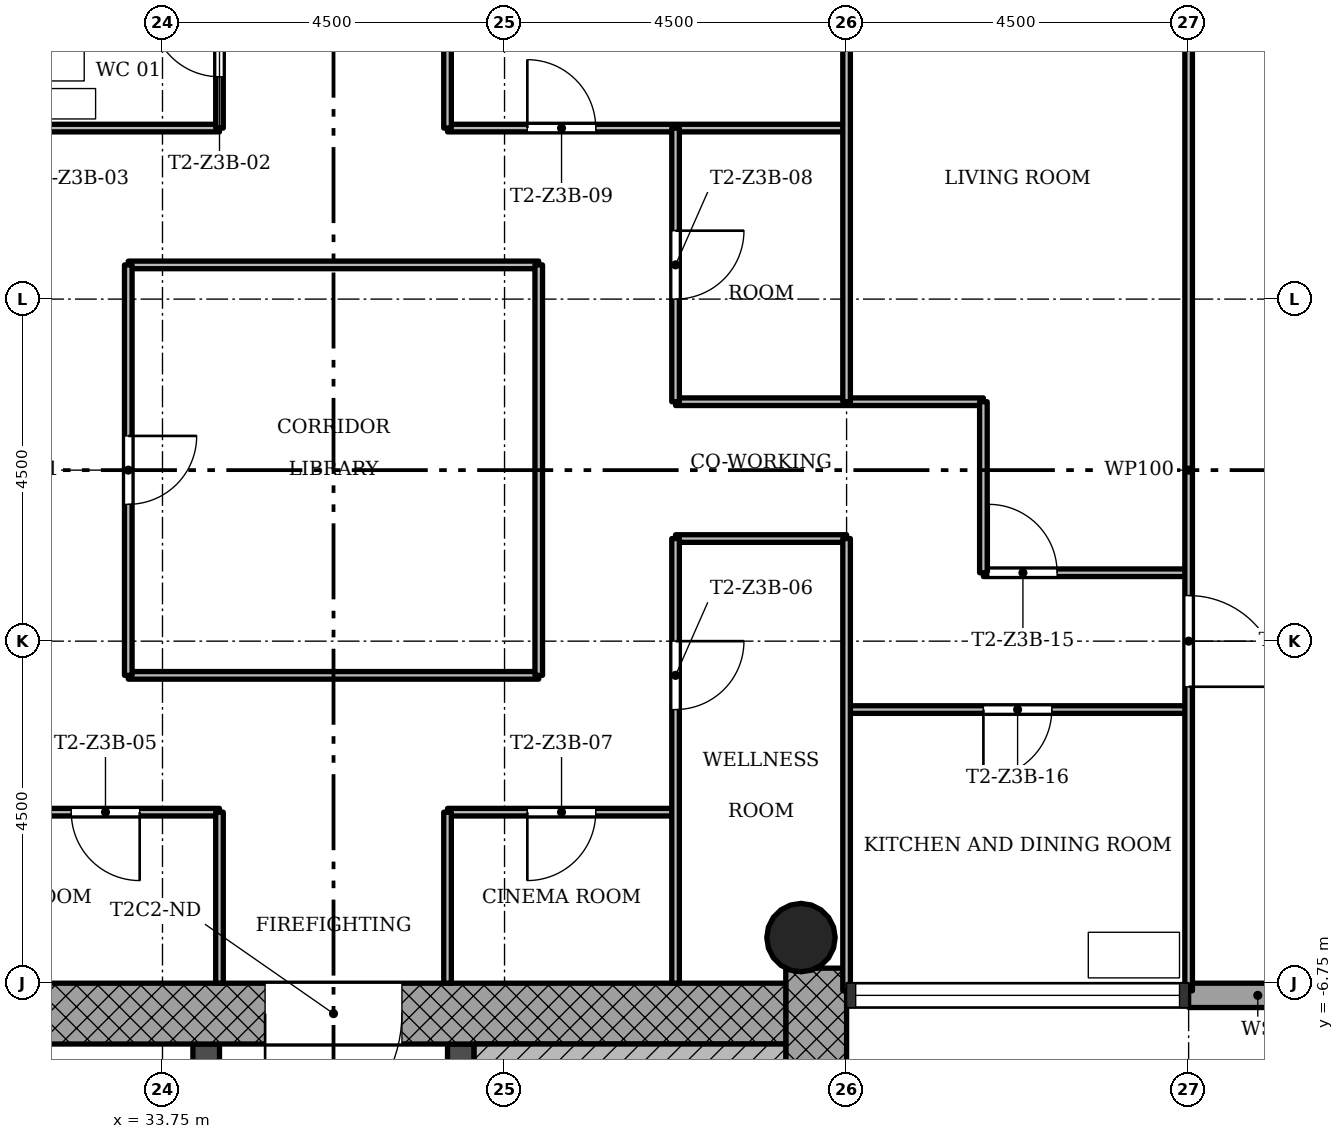
"""IFC4 building model, lengths in metres.
Left out: names, types, materials, properties, quantities, classifications, styles, units other than length and angle.
Written with IfcOpenShell. Run it as: python <this file> out.ifc"""

import sys

from ifc_helpers import new_model, si_unit, direction, frame, frame_2d, origin, origin_2d, place, context, subcontext, project, spatial, rectangle, hollow_circle, extrude, element, fill, save


model = new_model("IFC4")
c1 = context("Model", 3, precision=1e-05, world=origin(), true_north=direction((0.0, 1.0)))
c2 = subcontext(c1, "Body", "Model", "MODEL_VIEW")
j1 = project(units=[si_unit("LENGTHUNIT", "METRE"), si_unit("PLANEANGLEUNIT", "RADIAN")], contexts=[c1])
p1 = place(None, origin())
s1 = spatial("IfcSite", under=j1, at=p1, CompositionType="ELEMENT")
p2 = place(p1, origin())
s2 = spatial("IfcBuilding", under=s1, at=p2, CompositionType="ELEMENT")
p3 = place(p2, frame((0.0, 0.0, 143.9)))
s3 = spatial("IfcBuildingStorey", under=s2, at=p3, CompositionType="ELEMENT", Elevation=143.9)
p4 = place(p3, frame((42.35, -14.95, 0.0), z_axis=(0.0, 0.0, 1.0), x_axis=(0.0, 1.0, 0.0)))
e1 = element("IfcWall", 1, at=p4, inside=s3, PredefinedType="SHEAR", context=c2, shape_type="SweptSolid", body=[
    extrude(rectangle(XDim=8.398, YDim=0.8, at=frame_2d((4.199, 0.0))), origin(), (0.0, 0.0, 1.0), 3.4),
])
p5 = place(p3, frame((41.95, -7.15, 0.0), z_axis=(0.0, 0.0, 1.0), x_axis=(-1.0, 0.0, 0.0)))
e2 = element("IfcWall", 2, at=p5, inside=s3, PredefinedType="SHEAR", context=c2, shape_type="SweptSolid", body=[
    extrude(rectangle(XDim=12.7, YDim=0.8, at=frame_2d((6.35, 0.0))), origin(), (0.0, 0.0, 1.0), 3.4),
])
p6 = place(p5, frame((5.05, 0.0, 0.0)))
e3 = element("IfcOpeningElement", 3, at=p6, cuts=e2, PredefinedType="OPENING", context=c2, shape_type="SweptSolid", body=[
    extrude(rectangle(XDim=1.8, YDim=2.1, at=frame_2d((0.9, 1.05))), frame((0.0, 0.41, 0.0), z_axis=(0.0, -1.0, 0.0), x_axis=(1.0, 0.0, 0.0)), (0.0, 0.0, 1.0), 0.82),
])
p7 = place(p3, frame((34.325, -14.95, 0.0), z_axis=(0.0, 0.0, 1.0), x_axis=(0.0, 1.0, 0.0)))
e4 = element("IfcWall", 4, at=p7, inside=s3, PredefinedType="SHEAR", context=c2, shape_type="SweptSolid", body=[
    extrude(rectangle(XDim=7.4, YDim=0.35, at=frame_2d((3.7, 0.0))), origin(), (0.0, 0.0, 1.0), 3.4),
])
p8 = place(p7, frame((5.35, 0.0, 0.0)))
e5 = element("IfcOpeningElement", 5, at=p8, cuts=e4, PredefinedType="OPENING", context=c2, shape_type="SweptSolid", body=[
    extrude(rectangle(XDim=1.1, YDim=2.1, at=frame_2d((0.55, 1.05))), frame((0.0, 0.185, 0.0), z_axis=(0.0, -1.0, 0.0), x_axis=(1.0, 0.0, 0.0)), (0.0, 0.0, 1.0), 0.37),
])
p9 = place(p7, frame((1.0, 0.0, 0.0)))
e6 = element("IfcOpeningElement", 6, at=p9, cuts=e4, PredefinedType="OPENING", context=c2, shape_type="SweptSolid", body=[
    extrude(rectangle(XDim=1.1, YDim=2.1, at=frame_2d((0.55, 1.05))), frame((0.0, 0.185, 0.0), z_axis=(0.0, -1.0, 0.0), x_axis=(1.0, 0.0, 0.0)), (0.0, 0.0, 1.0), 0.37),
])
p10 = place(p7, frame((3.3, 0.0, 0.0)))
e7 = element("IfcOpeningElement", 7, at=p10, cuts=e4, PredefinedType="OPENING", context=c2, shape_type="SweptSolid", body=[
    extrude(rectangle(XDim=0.9, YDim=2.1, at=frame_2d((0.45, 1.05))), frame((0.0, 0.185, 0.0), z_axis=(0.0, -1.0, 0.0), x_axis=(1.0, 0.0, 0.0)), (0.0, 0.0, 1.0), 0.37),
])
p11 = place(p3, frame((37.675, -14.95, 0.0), z_axis=(0.0, 0.0, 1.0), x_axis=(0.0, 1.0, 0.0)))
e8 = element("IfcWall", 8, at=p11, inside=s3, PredefinedType="SHEAR", context=c2, shape_type="SweptSolid", body=[
    extrude(rectangle(XDim=7.4, YDim=0.35, at=frame_2d((3.7, 0.0))), origin(), (0.0, 0.0, 1.0), 3.4),
])
p12 = place(p11, frame((5.65, 0.0, 0.0)))
e9 = element("IfcOpeningElement", 9, at=p12, cuts=e8, PredefinedType="OPENING", context=c2, shape_type="SweptSolid", body=[
    extrude(rectangle(XDim=0.9, YDim=2.1, at=frame_2d((0.45, 1.05))), frame((0.0, 0.185, 0.0), z_axis=(0.0, -1.0, 0.0), x_axis=(1.0, 0.0, 0.0)), (0.0, 0.0, 1.0), 0.37),
])
p13 = place(p3, frame((42.15, -6.15, 0.0), z_axis=(0.0, 0.0, 1.0), x_axis=(1.0, 0.0, 0.0)))
e10 = element("IfcColumn", 10, at=p13, inside=s3, PredefinedType="COLUMN", context=c2, shape_type="SweptSolid", body=[
    extrude(hollow_circle(Radius=0.45, WallThickness=0.032, at=origin_2d()), origin(), (0.0, 0.0, 1.0), 3.4),
])
p14 = place(p3, frame((47.25, -6.91, -0.3), z_axis=(0.0, 0.0, 1.0), x_axis=(1.0, 0.0, 0.0)))
e11 = element("IfcWall", 11, at=p14, inside=s3, PredefinedType="STANDARD", context=c2, shape_type="SweptSolid", body=[
    extrude(rectangle(XDim=1.82, YDim=0.32, at=frame_2d((0.91, 0.0))), origin(), (0.0, 0.0, 1.0), 3.4),
])
p15 = place(p3, frame((40.5, -4.5, 0.0), z_axis=(0.0, 0.0, 1.0), x_axis=(-1.0, 0.0, 0.0)))
e12 = element("IfcWall", 12, at=p15, inside=s3, PredefinedType="PARTITIONING", context=c2, shape_type="SweptSolid", body=[
    extrude(rectangle(XDim=3.0, YDim=0.1, at=frame_2d((1.5, 0.0))), origin(), (0.0, 0.0, 1.0), 3.0),
])
p16 = place(p15, frame((1.05, 0.0, 0.0)))
e13 = element("IfcOpeningElement", 13, at=p16, cuts=e12, PredefinedType="OPENING", context=c2, shape_type="SweptSolid", body=[
    extrude(rectangle(XDim=0.9, YDim=2.1, at=frame_2d((0.45, 1.05))), frame((0.0, 0.06, 0.0), z_axis=(0.0, -1.0, 0.0), x_axis=(1.0, 0.0, 0.0)), (0.0, 0.0, 1.0), 0.12),
])
p17 = place(p3, frame((34.5, -4.5, 0.0), z_axis=(0.0, 0.0, 1.0), x_axis=(-1.0, 0.0, 0.0)))
e14 = element("IfcWall", 14, at=p17, inside=s3, PredefinedType="PARTITIONING", context=c2, shape_type="SweptSolid", body=[
    extrude(rectangle(XDim=5.25, YDim=0.1, at=frame_2d((2.625, 0.0))), origin(), (0.0, 0.0, 1.0), 3.0),
])
p18 = place(p17, frame((1.05, 0.0, 0.0)))
e15 = element("IfcOpeningElement", 15, at=p18, cuts=e14, PredefinedType="OPENING", context=c2, shape_type="SweptSolid", body=[
    extrude(rectangle(XDim=0.9, YDim=2.1, at=frame_2d((0.45, 1.05))), frame((0.0, 0.06, 0.0), z_axis=(0.0, -1.0, 0.0), x_axis=(1.0, 0.0, 0.0)), (0.0, 0.0, 1.0), 0.12),
])
p19 = place(p3, frame((47.25, -3.15, 0.0), z_axis=(0.0, 0.0, 1.0), x_axis=(-1.0, 0.0, 0.0)))
e16 = element("IfcWall", 16, at=p19, inside=s3, PredefinedType="PARTITIONING", context=c2, shape_type="SweptSolid", body=[
    extrude(rectangle(XDim=4.5, YDim=0.1, at=frame_2d((2.25, 0.0))), origin(), (0.0, 0.0, 1.0), 3.0),
])
p20 = place(p19, frame((1.8, 0.0, 0.0)))
e17 = element("IfcOpeningElement", 17, at=p20, cuts=e16, PredefinedType="OPENING", context=c2, shape_type="SweptSolid", body=[
    extrude(rectangle(XDim=0.9, YDim=2.1, at=frame_2d((0.45, 1.05))), frame((0.0, 0.06, 0.0), z_axis=(0.0, -1.0, 0.0), x_axis=(1.0, 0.0, 0.0)), (0.0, 0.0, 1.0), 0.12),
])
p21 = place(p3, frame((38.7, -2.7, 0.0), z_axis=(0.0, 0.0, 1.0), x_axis=(-1.0, 0.0, 0.0)))
e18 = element("IfcWall", 18, at=p21, inside=s3, PredefinedType="PARTITIONING", context=c2, shape_type="SweptSolid", body=[
    extrude(rectangle(XDim=5.4, YDim=0.1, at=frame_2d((2.7, 0.0))), origin(), (0.0, 0.0, 1.0), 3.0),
])
p22 = place(p3, frame((47.25, -1.35, 0.0), z_axis=(0.0, 0.0, 1.0), x_axis=(-1.0, 0.0, 0.0)))
e19 = element("IfcWall", 19, at=p22, inside=s3, PredefinedType="PARTITIONING", context=c2, shape_type="SweptSolid", body=[
    extrude(rectangle(XDim=2.7, YDim=0.1, at=frame_2d((1.35, 0.0))), origin(), (0.0, 0.0, 1.0), 3.0),
])
p23 = place(p22, frame((1.73, 0.0, 0.0)))
e20 = element("IfcOpeningElement", 20, at=p23, cuts=e19, PredefinedType="OPENING", context=c2, shape_type="SweptSolid", body=[
    extrude(rectangle(XDim=0.9, YDim=2.1, at=frame_2d((0.45, 1.05))), frame((0.0, 0.06, 0.0), z_axis=(0.0, -1.0, 0.0), x_axis=(1.0, 0.0, 0.0)), (0.0, 0.0, 1.0), 0.12),
])
p24 = place(p3, frame((42.75, -0.9, 0.0), z_axis=(0.0, 0.0, 1.0), x_axis=(-1.0, 0.0, 0.0)))
e21 = element("IfcWall", 21, at=p24, inside=s3, PredefinedType="PARTITIONING", context=c2, shape_type="SweptSolid", body=[
    extrude(rectangle(XDim=2.25, YDim=0.1, at=frame_2d((1.125, 0.0))), origin(), (0.0, 0.0, 1.0), 3.0),
])
p25 = place(p3, frame((44.55, 0.9, 0.0), z_axis=(0.0, 0.0, 1.0), x_axis=(-1.0, 0.0, 0.0)))
e22 = element("IfcWall", 22, at=p25, inside=s3, PredefinedType="PARTITIONING", context=c2, shape_type="SweptSolid", body=[
    extrude(rectangle(XDim=4.05, YDim=0.1, at=frame_2d((2.025, 0.0))), origin(), (0.0, 0.0, 1.0), 3.0),
])
p26 = place(p3, frame((38.7, 2.7, 0.0), z_axis=(0.0, 0.0, 1.0), x_axis=(-1.0, 0.0, 0.0)))
e23 = element("IfcWall", 23, at=p26, inside=s3, PredefinedType="PARTITIONING", context=c2, shape_type="SweptSolid", body=[
    extrude(rectangle(XDim=5.4, YDim=0.1, at=frame_2d((2.7, 0.0))), origin(), (0.0, 0.0, 1.0), 3.0),
])
p27 = place(p3, frame((42.75, 4.5, 0.0), z_axis=(0.0, 0.0, 1.0), x_axis=(-1.0, 0.0, 0.0)))
e24 = element("IfcWall", 24, at=p27, inside=s3, PredefinedType="PARTITIONING", context=c2, shape_type="SweptSolid", body=[
    extrude(rectangle(XDim=5.25, YDim=0.1, at=frame_2d((2.625, 0.0))), origin(), (0.0, 0.0, 1.0), 3.0),
])
p28 = place(p27, frame((3.3, 0.0, 0.0)))
e25 = element("IfcOpeningElement", 25, at=p28, cuts=e24, PredefinedType="OPENING", context=c2, shape_type="SweptSolid", body=[
    extrude(rectangle(XDim=0.9, YDim=2.1, at=frame_2d((0.45, 1.05))), frame((0.0, 0.06, 0.0), z_axis=(0.0, -1.0, 0.0), x_axis=(1.0, 0.0, 0.0)), (0.0, 0.0, 1.0), 0.12),
])
p29 = place(p3, frame((34.5, 4.5, 0.0), z_axis=(0.0, 0.0, 1.0), x_axis=(-1.0, 0.0, 0.0)))
e26 = element("IfcWall", 26, at=p29, inside=s3, PredefinedType="PARTITIONING", context=c2, shape_type="SweptSolid", body=[
    extrude(rectangle(XDim=3.0, YDim=0.1, at=frame_2d((1.5, 0.0))), origin(), (0.0, 0.0, 1.0), 3.0),
])
p30 = place(p3, frame((47.25, -6.85, 0.0), z_axis=(0.0, 0.0, 1.0), x_axis=(0.0, 1.0, 0.0)))
e27 = element("IfcWall", 27, at=p30, inside=s3, PredefinedType="PARTITIONING", context=c2, shape_type="SweptSolid", body=[
    extrude(rectangle(XDim=13.7, YDim=0.1, at=frame_2d((6.85, 0.0))), origin(), (0.0, 0.0, 1.0), 3.0),
])
p31 = place(p30, frame((4.0, 0.0, 0.0)))
e28 = element("IfcOpeningElement", 28, at=p31, cuts=e27, PredefinedType="OPENING", context=c2, shape_type="SweptSolid", body=[
    extrude(rectangle(XDim=1.2, YDim=2.1, at=frame_2d((0.6, 1.05))), frame((0.0, 0.06, 0.0), z_axis=(0.0, -1.0, 0.0), x_axis=(1.0, 0.0, 0.0)), (0.0, 0.0, 1.0), 0.12),
])
p32 = place(p3, frame((44.55, -1.35, 0.0), z_axis=(0.0, 0.0, 1.0), x_axis=(0.0, 1.0, 0.0)))
e29 = element("IfcWall", 29, at=p32, inside=s3, PredefinedType="PARTITIONING", context=c2, shape_type="SweptSolid", body=[
    extrude(rectangle(XDim=2.25, YDim=0.1, at=frame_2d((1.125, 0.0))), origin(), (0.0, 0.0, 1.0), 3.0),
])
for number, where, z_axis, x_axis in (
    (30, (42.75, -6.85, 0.0), (0.0, 0.0, 1.0), (0.0, 1.0, 0.0)),
    (31, (42.75, 0.9, 0.0), (0.0, 0.0, 1.0), (0.0, 1.0, 0.0)),
):
    element("IfcWall", number, at=place(p3, frame(where, z_axis=z_axis, x_axis=x_axis)), inside=s3, PredefinedType="PARTITIONING", context=c2, shape_type="SweptSolid", body=[
        extrude(rectangle(XDim=5.95, YDim=0.1, at=frame_2d((2.975, 0.0))), origin(), (0.0, 0.0, 1.0), 3.0),
    ])
p33 = place(p3, frame((40.5, -6.75, 0.0), z_axis=(0.0, 0.0, 1.0), x_axis=(0.0, 1.0, 0.0)))
e32 = element("IfcWall", 32, at=p33, inside=s3, PredefinedType="PARTITIONING", context=c2, shape_type="SweptSolid", body=[
    extrude(rectangle(XDim=5.85, YDim=0.1, at=frame_2d((2.925, 0.0))), origin(), (0.0, 0.0, 1.0), 3.0),
])
p34 = place(p33, frame((3.6, 0.0, 0.0)))
e33 = element("IfcOpeningElement", 33, at=p34, cuts=e32, PredefinedType="OPENING", context=c2, shape_type="SweptSolid", body=[
    extrude(rectangle(XDim=0.9, YDim=2.1, at=frame_2d((0.45, 1.05))), frame((0.0, 0.06, 0.0), z_axis=(0.0, -1.0, 0.0), x_axis=(1.0, 0.0, 0.0)), (0.0, 0.0, 1.0), 0.12),
])
p35 = place(p3, frame((40.5, 0.9, 0.0), z_axis=(0.0, 0.0, 1.0), x_axis=(0.0, 1.0, 0.0)))
e34 = element("IfcWall", 34, at=p35, inside=s3, PredefinedType="PARTITIONING", context=c2, shape_type="SweptSolid", body=[
    extrude(rectangle(XDim=3.6, YDim=0.1, at=frame_2d((1.8, 0.0))), origin(), (0.0, 0.0, 1.0), 3.0),
])
p36 = place(p35, frame((1.35, 0.0, 0.0)))
e35 = element("IfcOpeningElement", 35, at=p36, cuts=e34, PredefinedType="OPENING", context=c2, shape_type="SweptSolid", body=[
    extrude(rectangle(XDim=0.9, YDim=2.1, at=frame_2d((0.45, 1.05))), frame((0.0, 0.06, 0.0), z_axis=(0.0, -1.0, 0.0), x_axis=(1.0, 0.0, 0.0)), (0.0, 0.0, 1.0), 0.12),
])
p37 = place(p3, frame((38.7, -2.7, 0.0), z_axis=(0.0, 0.0, 1.0), x_axis=(0.0, 1.0, 0.0)))
e36 = element("IfcWall", 36, at=p37, inside=s3, PredefinedType="PARTITIONING", context=c2, shape_type="SweptSolid", body=[
    extrude(rectangle(XDim=5.4, YDim=0.1, at=frame_2d((2.7, 0.0))), origin(), (0.0, 0.0, 1.0), 3.0),
])
for number, where, z_axis, x_axis in (
    (37, (37.5, -6.75, 0.0), (0.0, 0.0, 1.0), (0.0, 1.0, 0.0)),
    (38, (37.5, 4.5, 0.0), (0.0, 0.0, 1.0), (0.0, 1.0, 0.0)),
    (39, (34.5, -6.75, 0.0), (0.0, 0.0, 1.0), (0.0, 1.0, 0.0)),
):
    element("IfcWall", number, at=place(p3, frame(where, z_axis=z_axis, x_axis=x_axis)), inside=s3, PredefinedType="PARTITIONING", context=c2, shape_type="SweptSolid", body=[
        extrude(rectangle(XDim=2.25, YDim=0.1, at=frame_2d((1.125, 0.0))), origin(), (0.0, 0.0, 1.0), 3.0),
    ])
p38 = place(p3, frame((34.5, 4.5, 0.0), z_axis=(0.0, 0.0, 1.0), x_axis=(0.0, 1.0, 0.0)))
e40 = element("IfcWall", 40, at=p38, inside=s3, PredefinedType="PARTITIONING", context=c2, shape_type="SweptSolid", body=[
    extrude(rectangle(XDim=2.25, YDim=0.1, at=frame_2d((1.125, 0.0))), origin(), (0.0, 0.0, 1.0), 3.0),
])
p39 = place(p38, frame((0.675, 0.0, 0.0)))
e41 = element("IfcOpeningElement", 41, at=p39, cuts=e40, PredefinedType="OPENING", context=c2, shape_type="SweptSolid", body=[
    extrude(rectangle(XDim=0.9, YDim=2.1, at=frame_2d((0.45, 1.05))), frame((0.0, 0.06, 0.0), z_axis=(0.0, -1.0, 0.0), x_axis=(1.0, 0.0, 0.0)), (0.0, 0.0, 1.0), 0.12),
])
p40 = place(p3, frame((33.3, -2.7, 0.0), z_axis=(0.0, 0.0, 1.0), x_axis=(0.0, 1.0, 0.0)))
e42 = element("IfcWall", 42, at=p40, inside=s3, PredefinedType="PARTITIONING", context=c2, shape_type="SweptSolid", body=[
    extrude(rectangle(XDim=5.4, YDim=0.1, at=frame_2d((2.7, 0.0))), origin(), (0.0, 0.0, 1.0), 3.0),
])
p41 = place(p40, frame((2.25, 0.0, 0.0)))
e43 = element("IfcOpeningElement", 43, at=p41, cuts=e42, PredefinedType="OPENING", context=c2, shape_type="SweptSolid", body=[
    extrude(rectangle(XDim=0.9, YDim=2.1, at=frame_2d((0.45, 1.05))), frame((0.0, 0.06, 0.0), z_axis=(0.0, -1.0, 0.0), x_axis=(1.0, 0.0, 0.0)), (0.0, 0.0, 1.0), 0.12),
])
p42 = place(p3, frame((37.85, -7.75, 0.0), z_axis=(0.0, 0.0, 1.0), x_axis=(1.0, 0.0, 0.0)))
e44 = element("IfcWall", 44, at=p42, inside=s3, PredefinedType="SHEAR", context=c2, shape_type="SweptSolid", body=[
    extrude(rectangle(XDim=4.1, YDim=0.4, at=frame_2d((2.05, 0.0))), origin(), (0.0, 0.0, 1.0), 3.4),
])
p43 = place(p41, origin())
e45 = element("IfcDoor", 45, at=p43, inside=s3, OperationType="SINGLE_SWING_RIGHT", PredefinedType="DOOR", context=c2, shape_type="SweptSolid", body=[
    extrude(rectangle(XDim=0.9, YDim=2.1, at=frame_2d((0.45, 1.05))), frame((0.0, 0.025, 0.0), z_axis=(0.0, -1.0, 0.0), x_axis=(1.0, 0.0, 0.0)), (0.0, 0.0, 1.0), 0.05),
])
fill(e43, e45)
p44 = place(p39, origin())
e46 = element("IfcDoor", 46, at=p44, inside=s3, OperationType="SINGLE_SWING_LEFT", PredefinedType="DOOR", context=c2, shape_type="SweptSolid", body=[
    extrude(rectangle(XDim=0.9, YDim=2.1, at=frame_2d((0.45, 1.05))), frame((0.0, 0.025, 0.0), z_axis=(0.0, -1.0, 0.0), x_axis=(1.0, 0.0, 0.0)), (0.0, 0.0, 1.0), 0.05),
])
fill(e41, e46)
p45 = place(p18, origin())
e47 = element("IfcDoor", 47, at=p45, inside=s3, OperationType="SINGLE_SWING_RIGHT", PredefinedType="DOOR", context=c2, shape_type="SweptSolid", body=[
    extrude(rectangle(XDim=0.9, YDim=2.1, at=frame_2d((0.45, 1.05))), frame((0.0, 0.025, 0.0), z_axis=(0.0, -1.0, 0.0), x_axis=(1.0, 0.0, 0.0)), (0.0, 0.0, 1.0), 0.05),
])
fill(e15, e47)
p46 = place(p34, origin())
e48 = element("IfcDoor", 48, at=p46, inside=s3, OperationType="SINGLE_SWING_RIGHT", PredefinedType="DOOR", context=c2, shape_type="SweptSolid", body=[
    extrude(rectangle(XDim=0.9, YDim=2.1, at=frame_2d((0.45, 1.05))), frame((0.0, 0.025, 0.0), z_axis=(0.0, -1.0, 0.0), x_axis=(1.0, 0.0, 0.0)), (0.0, 0.0, 1.0), 0.05),
])
fill(e33, e48)
p47 = place(p16, origin())
e49 = element("IfcDoor", 49, at=p47, inside=s3, OperationType="SINGLE_SWING_LEFT", PredefinedType="DOOR", context=c2, shape_type="SweptSolid", body=[
    extrude(rectangle(XDim=0.9, YDim=2.1, at=frame_2d((0.45, 1.05))), frame((0.0, 0.025, 0.0), z_axis=(0.0, -1.0, 0.0), x_axis=(1.0, 0.0, 0.0)), (0.0, 0.0, 1.0), 0.05),
])
fill(e13, e49)
p48 = place(p36, origin())
e50 = element("IfcDoor", 50, at=p48, inside=s3, OperationType="SINGLE_SWING_RIGHT", PredefinedType="DOOR", context=c2, shape_type="SweptSolid", body=[
    extrude(rectangle(XDim=0.9, YDim=2.1, at=frame_2d((0.45, 1.05))), frame((0.0, 0.025, 0.0), z_axis=(0.0, -1.0, 0.0), x_axis=(1.0, 0.0, 0.0)), (0.0, 0.0, 1.0), 0.05),
])
fill(e35, e50)
p49 = place(p28, origin())
e51 = element("IfcDoor", 51, at=p49, inside=s3, OperationType="SINGLE_SWING_RIGHT", PredefinedType="DOOR", context=c2, shape_type="SweptSolid", body=[
    extrude(rectangle(XDim=0.9, YDim=2.1, at=frame_2d((0.45, 1.05))), frame((0.0, 0.025, 0.0), z_axis=(0.0, -1.0, 0.0), x_axis=(1.0, 0.0, 0.0)), (0.0, 0.0, 1.0), 0.05),
])
fill(e25, e51)
p50 = place(p23, origin())
e52 = element("IfcDoor", 52, at=p50, inside=s3, OperationType="SINGLE_SWING_RIGHT", PredefinedType="DOOR", context=c2, shape_type="SweptSolid", body=[
    extrude(rectangle(XDim=0.9, YDim=2.1, at=frame_2d((0.45, 1.05))), frame((0.0, 0.025, 0.0), z_axis=(0.0, -1.0, 0.0), x_axis=(1.0, 0.0, 0.0)), (0.0, 0.0, 1.0), 0.05),
])
fill(e20, e52)
p51 = place(p20, origin())
e53 = element("IfcDoor", 53, at=p51, inside=s3, OperationType="SINGLE_SWING_LEFT", PredefinedType="DOOR", context=c2, shape_type="SweptSolid", body=[
    extrude(rectangle(XDim=0.9, YDim=2.1, at=frame_2d((0.45, 1.05))), frame((0.0, 0.025, 0.0), z_axis=(0.0, -1.0, 0.0), x_axis=(1.0, 0.0, 0.0)), (0.0, 0.0, 1.0), 0.05),
])
fill(e17, e53)
p52 = place(p31, origin())
e54 = element("IfcDoor", 54, at=p52, inside=s3, OperationType="SINGLE_SWING_LEFT", PredefinedType="DOOR", context=c2, shape_type="SweptSolid", body=[
    extrude(rectangle(XDim=1.2, YDim=2.1, at=frame_2d((0.6, 1.05))), frame((0.0, 0.025, 0.0), z_axis=(0.0, -1.0, 0.0), x_axis=(1.0, 0.0, 0.0)), (0.0, 0.0, 1.0), 0.05),
])
fill(e28, e54)
p53 = place(p6, origin())
e55 = element("IfcDoor", 55, at=p53, inside=s3, OperationType="SINGLE_SWING_LEFT", PredefinedType="DOOR", context=c2, shape_type="SweptSolid", body=[
    extrude(rectangle(XDim=1.8, YDim=2.1, at=frame_2d((0.9, 1.05))), frame((0.0, 0.025, 0.0), z_axis=(0.0, -1.0, 0.0), x_axis=(1.0, 0.0, 0.0)), (0.0, 0.0, 1.0), 0.05),
])
fill(e3, e55)
save(model, sys.argv[1])
